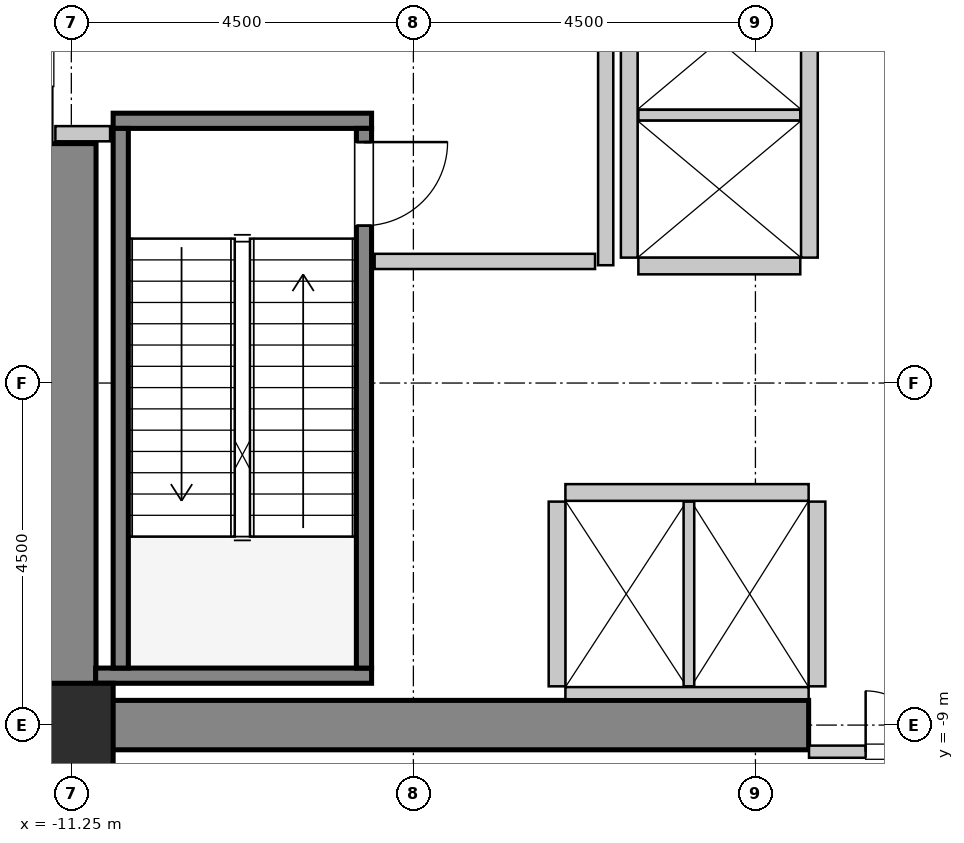
"""IFC4 building model, lengths in metres.
Left out: names, types, materials, properties, quantities, classifications, styles, units other than length and angle.
Written with IfcOpenShell. Run it as: python <this file> out.ifc"""

import sys

from ifc_helpers import new_model, si_unit, direction, frame, frame_2d, origin, origin_2d, place, context, subcontext, project, spatial, rectangle, hollow_rectangle, extrude, source, transform, mapped, element, fill, save


model = new_model("IFC4")
c1 = context("Model", 3, precision=1e-05, world=origin(), true_north=direction((0.0, 1.0)))
c2 = subcontext(c1, "Body", "Model", "MODEL_VIEW")
j1 = project(units=[si_unit("LENGTHUNIT", "METRE"), si_unit("PLANEANGLEUNIT", "RADIAN")], contexts=[c1])
p1 = place(None, origin())
s1 = spatial("IfcSite", under=j1, at=p1, CompositionType="ELEMENT")
p2 = place(p1, origin())
s2 = spatial("IfcBuilding", under=s1, at=p2, CompositionType="ELEMENT")
p3 = place(p2, frame((0.0, 0.0, 27.6)))
s3 = spatial("IfcBuildingStorey", under=s2, at=p3, CompositionType="ELEMENT", Elevation=27.6)
m1 = source(origin(), c2, "Body", "SweptSolid", [
    extrude(rectangle(XDim=10.025, YDim=0.65, at=frame_2d((5.012, 0.0))), origin(), (0.0, 0.0, 1.0), 5.4),
])
p4 = place(p3, frame((-11.575, -9.0, 0.0), z_axis=(0.0, 0.0, 1.0), x_axis=(1.0, 0.0, 0.0)))
e1 = element("IfcWall", 1, at=p4, inside=s3, PredefinedType="SHEAR", context=c2, shape_type="MappedRepresentation", body=[
    mapped(m1, transform((0.0, 0.0, 0.0), x_axis=(1.0, 0.0, 0.0), y_axis=(0.0, 1.0, 0.0), z_axis=(0.0, 0.0, 1.0), scale=1.0)),
])
m2 = source(origin(), c2, "Body", "SweptSolid", [
    extrude(rectangle(XDim=7.325, YDim=0.65, at=frame_2d((3.663, 0.0))), origin(), (0.0, 0.0, 1.0), 5.4),
])
p5 = place(p3, frame((-11.25, -8.675, 0.0), z_axis=(0.0, 0.0, 1.0), x_axis=(0.0, 1.0, 0.0)))
e2 = element("IfcWall", 2, at=p5, inside=s3, PredefinedType="SHEAR", context=c2, shape_type="MappedRepresentation", body=[
    mapped(m2, transform((0.0, 0.0, 0.0), x_axis=(1.0, 0.0, 0.0), y_axis=(0.0, 1.0, 0.0), z_axis=(0.0, 0.0, 1.0), scale=1.0)),
])
m3 = source(origin(), c2, "Body", "SweptSolid", [
    extrude(hollow_rectangle(XDim=1.1, YDim=1.1, WallThickness=0.055, InnerFilletRadius=0.055, OuterFilletRadius=0.11, at=origin_2d()), origin(), (0.0, 0.0, 1.0), 5.4),
])
p6 = place(p3, frame((-11.25, -9.0, 0.0), z_axis=(0.0, 0.0, 1.0), x_axis=(1.0, 0.0, 0.0)))
e3 = element("IfcColumn", 3, at=p6, inside=s3, PredefinedType="COLUMN", context=c2, shape_type="MappedRepresentation", body=[
    mapped(m3, transform((0.0, 0.0, 0.0), x_axis=(1.0, 0.0, 0.0), y_axis=(0.0, 1.0, 0.0), z_axis=(0.0, 0.0, 1.0), scale=1.0)),
])
m4 = source(origin(), c2, "Body", "SweptSolid", [
    extrude(rectangle(XDim=3.4, YDim=0.2, at=frame_2d((1.7, 0.0))), origin(), (0.0, 0.0, 1.0), 5.4),
])
p7 = place(p3, frame((-10.7, -1.05, 0.0), z_axis=(0.0, 0.0, 1.0), x_axis=(1.0, 0.0, 0.0)))
e4 = element("IfcWall", 4, at=p7, inside=s3, PredefinedType="SOLIDWALL", context=c2, shape_type="MappedRepresentation", body=[
    mapped(m4, transform((0.0, 0.0, 0.0), x_axis=(1.0, 0.0, 0.0), y_axis=(0.0, 1.0, 0.0), z_axis=(0.0, 0.0, 1.0), scale=1.0)),
])
m5 = source(origin(), c2, "Body", "SweptSolid", [
    extrude(rectangle(XDim=3.63, YDim=0.2, at=frame_2d((1.815, 0.0))), origin(), (0.0, 0.0, 1.0), 5.4),
])
p8 = place(p3, frame((-10.93, -8.35, 0.0), z_axis=(0.0, 0.0, 1.0), x_axis=(1.0, 0.0, 0.0)))
e5 = element("IfcWall", 5, at=p8, inside=s3, PredefinedType="SOLIDWALL", context=c2, shape_type="MappedRepresentation", body=[
    mapped(m5, transform((0.0, 0.0, 0.0), x_axis=(1.0, 0.0, 0.0), y_axis=(0.0, 1.0, 0.0), z_axis=(0.0, 0.0, 1.0), scale=1.0)),
])
m6 = source(origin(), c2, "Body", "SweptSolid", [
    extrude(rectangle(XDim=7.1, YDim=0.2, at=frame_2d((3.55, 0.0))), origin(), (0.0, 0.0, 1.0), 5.4),
])
p9 = place(p3, frame((-10.6, -1.15, 0.0), z_axis=(0.0, 0.0, 1.0), x_axis=(0.0, -1.0, 0.0)))
e6 = element("IfcWall", 6, at=p9, inside=s3, PredefinedType="SOLIDWALL", context=c2, shape_type="MappedRepresentation", body=[
    mapped(m6, transform((0.0, 0.0, 0.0), x_axis=(1.0, 0.0, 0.0), y_axis=(0.0, 1.0, 0.0), z_axis=(0.0, 0.0, 1.0), scale=1.0)),
])
p10 = place(p3, frame((-7.4, -1.15, 0.0), z_axis=(0.0, 0.0, 1.0), x_axis=(0.0, -1.0, 0.0)))
e7 = element("IfcWall", 7, at=p10, inside=s3, PredefinedType="SOLIDWALL", context=c2, shape_type="MappedRepresentation", body=[
    mapped(m6, transform((0.0, 0.0, 0.0), x_axis=(1.0, 0.0, 0.0), y_axis=(0.0, 1.0, 0.0), z_axis=(0.0, 0.0, 1.0), scale=1.0)),
])
p11 = place(p10, frame((0.18, 0.0, 0.0)))
e8 = element("IfcOpeningElement", 8, at=p11, cuts=e7, PredefinedType="OPENING", context=c2, shape_type="SweptSolid", body=[
    extrude(rectangle(XDim=1.1, YDim=2.15, at=frame_2d((0.55, 1.075))), frame((0.0, 0.11, 0.0), z_axis=(0.0, -1.0, 0.0), x_axis=(1.0, 0.0, 0.0)), (0.0, 0.0, 1.0), 0.22),
])
m7 = source(origin(), c2, "Body", "SweptSolid", [
    extrude(rectangle(XDim=3.2, YDim=0.22, at=frame_2d((1.6, 0.0))), origin(), (0.0, 0.0, 1.0), 5.135),
])
p12 = place(p3, frame((-1.55, -5.94, 0.0), z_axis=(0.0, 0.0, 1.0), x_axis=(-1.0, 0.0, 0.0)))
e9 = element("IfcWall", 9, at=p12, inside=s3, PredefinedType="SOLIDWALL", context=c2, shape_type="MappedRepresentation", body=[
    mapped(m7, transform((0.0, 0.0, 0.0), x_axis=(1.0, 0.0, 0.0), y_axis=(0.0, 1.0, 0.0), z_axis=(0.0, 0.0, 1.0), scale=1.0)),
])
m8 = source(origin(), c2, "Body", "SweptSolid", [
    extrude(rectangle(XDim=3.2, YDim=0.16, at=frame_2d((1.6, 0.0))), origin(), (0.0, 0.0, 1.0), 4.025),
])
p13 = place(p3, frame((-4.75, -8.58, 0.0), z_axis=(0.0, 0.0, 1.0), x_axis=(1.0, 0.0, 0.0)))
e10 = element("IfcWall", 10, at=p13, inside=s3, PredefinedType="PARTITIONING", context=c2, shape_type="MappedRepresentation", body=[
    mapped(m8, transform((0.0, 0.0, 0.0), x_axis=(1.0, 0.0, 0.0), y_axis=(0.0, 1.0, 0.0), z_axis=(0.0, 0.0, 1.0), scale=1.0)),
])
m9 = source(origin(), c2, "Body", "SweptSolid", [
    extrude(rectangle(XDim=2.43, YDim=0.22, at=frame_2d((1.215, 0.0))), origin(), (0.0, 0.0, 1.0), 5.135),
])
p14 = place(p3, frame((-4.86, -6.06, 0.0), z_axis=(0.0, 0.0, 1.0), x_axis=(0.0, -1.0, 0.0)))
e11 = element("IfcWall", 11, at=p14, inside=s3, PredefinedType="SOLIDWALL", context=c2, shape_type="MappedRepresentation", body=[
    mapped(m9, transform((0.0, 0.0, 0.0), x_axis=(1.0, 0.0, 0.0), y_axis=(0.0, 1.0, 0.0), z_axis=(0.0, 0.0, 1.0), scale=1.0)),
])
m10 = source(origin(), c2, "Body", "SweptSolid", [
    extrude(rectangle(XDim=2.43, YDim=0.14, at=frame_2d((1.215, 0.0))), origin(), (0.0, 0.0, 1.0), 5.135),
])
p15 = place(p3, frame((-3.125, -8.49, 0.0), z_axis=(0.0, 0.0, 1.0), x_axis=(0.0, 1.0, 0.0)))
e12 = element("IfcWall", 12, at=p15, inside=s3, PredefinedType="PARTITIONING", context=c2, shape_type="MappedRepresentation", body=[
    mapped(m10, transform((0.0, 0.0, 0.0), x_axis=(1.0, 0.0, 0.0), y_axis=(0.0, 1.0, 0.0), z_axis=(0.0, 0.0, 1.0), scale=1.0)),
])
p16 = place(p3, frame((-1.44, -8.49, 0.0), z_axis=(0.0, 0.0, 1.0), x_axis=(0.0, 1.0, 0.0)))
e13 = element("IfcWall", 13, at=p16, inside=s3, PredefinedType="SOLIDWALL", context=c2, shape_type="MappedRepresentation", body=[
    mapped(m9, transform((0.0, 0.0, 0.0), x_axis=(1.0, 0.0, 0.0), y_axis=(0.0, 1.0, 0.0), z_axis=(0.0, 0.0, 1.0), scale=1.0)),
])
m11 = source(origin(), c2, "Body", "SweptSolid", [
    extrude(rectangle(XDim=5.7, YDim=0.22, at=frame_2d((2.85, 0.0))), origin(), (0.0, 0.0, 1.0), 5.135),
])
for number, where, z_axis, x_axis in (
    (14, (-1.54, -2.85, 0.0), (0.0, 0.0, 1.0), (0.0, 1.0, 0.0)),
    (15, (-3.91, 2.85, 0.0), (0.0, 0.0, 1.0), (0.0, -1.0, 0.0)),
):
    element("IfcWall", number, at=place(p3, frame(where, z_axis=z_axis, x_axis=x_axis)), inside=s3, PredefinedType="SOLIDWALL", context=c2, shape_type="MappedRepresentation", body=[
        mapped(m11, transform((0.0, 0.0, 0.0), x_axis=(1.0, 0.0, 0.0), y_axis=(0.0, 1.0, 0.0), z_axis=(0.0, 0.0, 1.0), scale=1.0)),
    ])
m12 = source(origin(), c2, "Body", "SweptSolid", [
    extrude(rectangle(XDim=2.13, YDim=0.22, at=frame_2d((1.065, 0.0))), origin(), (0.0, 0.0, 1.0), 5.135),
])
p17 = place(p3, frame((-3.79, -2.96, 0.0), z_axis=(0.0, 0.0, 1.0), x_axis=(1.0, 0.0, 0.0)))
e16 = element("IfcWall", 16, at=p17, inside=s3, PredefinedType="SOLIDWALL", context=c2, shape_type="MappedRepresentation", body=[
    mapped(m12, transform((0.0, 0.0, 0.0), x_axis=(1.0, 0.0, 0.0), y_axis=(0.0, 1.0, 0.0), z_axis=(0.0, 0.0, 1.0), scale=1.0)),
])
m13 = source(origin(), c2, "Body", "SweptSolid", [
    extrude(rectangle(XDim=2.13, YDim=0.14, at=frame_2d((1.065, 0.0))), origin(), (0.0, 0.0, 1.0), 5.135),
])
p18 = place(p3, frame((-3.79, -0.975, 0.0), z_axis=(0.0, 0.0, 1.0), x_axis=(1.0, 0.0, 0.0)))
e17 = element("IfcWall", 17, at=p18, inside=s3, PredefinedType="PARTITIONING", context=c2, shape_type="MappedRepresentation", body=[
    mapped(m13, transform((0.0, 0.0, 0.0), x_axis=(1.0, 0.0, 0.0), y_axis=(0.0, 1.0, 0.0), z_axis=(0.0, 0.0, 1.0), scale=1.0)),
])
m14 = source(origin(), c2, "Body", "SweptSolid", [
    extrude(rectangle(XDim=5.9, YDim=0.2, at=frame_2d((2.95, 0.0))), origin(), (0.0, 0.0, 1.0), 5.135),
])
p19 = place(p3, frame((-4.22, -2.95, 0.0), z_axis=(0.0, 0.0, 1.0), x_axis=(0.0, 1.0, 0.0)))
e18 = element("IfcWall", 18, at=p19, inside=s3, PredefinedType="PARTITIONING", context=c2, shape_type="MappedRepresentation", body=[
    mapped(m14, transform((0.0, 0.0, 0.0), x_axis=(1.0, 0.0, 0.0), y_axis=(0.0, 1.0, 0.0), z_axis=(0.0, 0.0, 1.0), scale=1.0)),
])
m15 = source(origin(), c2, "Body", "SweptSolid", [
    extrude(rectangle(XDim=2.9, YDim=0.2, at=frame_2d((1.45, 0.0))), origin(), (0.0, 0.0, 1.0), 5.135),
])
p20 = place(p3, frame((-7.26, -2.9, 0.0), z_axis=(0.0, 0.0, 1.0), x_axis=(1.0, 0.0, 0.0)))
e19 = element("IfcWall", 19, at=p20, inside=s3, PredefinedType="PARTITIONING", context=c2, shape_type="MappedRepresentation", body=[
    mapped(m15, transform((0.0, 0.0, 0.0), x_axis=(1.0, 0.0, 0.0), y_axis=(0.0, 1.0, 0.0), z_axis=(0.0, 0.0, 1.0), scale=1.0)),
])
m16 = source(origin(), c2, "Body", "SweptSolid", [
    extrude(rectangle(XDim=0.72, YDim=0.2, at=frame_2d((0.36, 0.0))), origin(), (0.0, 0.0, 1.0), 5.135),
])
p21 = place(p3, frame((-11.46, -1.22, 0.0), z_axis=(0.0, 0.0, 1.0), x_axis=(1.0, 0.0, 0.0)))
e20 = element("IfcWall", 20, at=p21, inside=s3, PredefinedType="PARTITIONING", context=c2, shape_type="MappedRepresentation", body=[
    mapped(m16, transform((0.0, 0.0, 0.0), x_axis=(1.0, 0.0, 0.0), y_axis=(0.0, 1.0, 0.0), z_axis=(0.0, 0.0, 1.0), scale=1.0)),
])
m17 = source(origin(), c2, "Body", "SweptSolid", [
    extrude(rectangle(XDim=3.09, YDim=0.16, at=frame_2d((1.545, 0.0))), origin(), (0.0, 0.0, 1.0), 4.025),
])
p22 = place(p3, frame((-1.545, -9.35, 0.0), z_axis=(0.0, 0.0, 1.0), x_axis=(1.0, 0.0, 0.0)))
e21 = element("IfcWall", 21, at=p22, inside=s3, PredefinedType="PARTITIONING", context=c2, shape_type="MappedRepresentation", body=[
    mapped(m17, transform((0.0, 0.0, 0.0), x_axis=(1.0, 0.0, 0.0), y_axis=(0.0, 1.0, 0.0), z_axis=(0.0, 0.0, 1.0), scale=1.0)),
])
p23 = place(p22, frame((0.745, 0.0, 0.0)))
e22 = element("IfcOpeningElement", 22, at=p23, cuts=e21, PredefinedType="OPENING", context=c2, shape_type="SweptSolid", body=[
    extrude(rectangle(XDim=1.6, YDim=2.3, at=frame_2d((0.8, 1.15))), frame((0.0, 0.09, 0.0), z_axis=(0.0, -1.0, 0.0), x_axis=(1.0, 0.0, 0.0)), (0.0, 0.0, 1.0), 0.18),
])
m18 = source(origin(), c2, "Body", "SweptSolid", [
    extrude(rectangle(XDim=1.1, YDim=2.15, at=frame_2d((0.55, 1.075))), frame((0.0, 0.025, 0.0), z_axis=(0.0, -1.0, 0.0), x_axis=(1.0, 0.0, 0.0)), (0.0, 0.0, 1.0), 0.05),
])
p24 = place(p11, origin())
e23 = element("IfcDoor", 23, at=p24, inside=s3, OperationType="SINGLE_SWING_LEFT", PredefinedType="DOOR", context=c2, shape_type="MappedRepresentation", body=[
    mapped(m18, transform((0.0, 0.0, 0.0), x_axis=(1.0, 0.0, 0.0), y_axis=(0.0, 1.0, 0.0), z_axis=(0.0, 0.0, 1.0), scale=1.0)),
])
fill(e8, e23)
m19 = source(origin(), c2, "Body", "SweptSolid", [
    extrude(rectangle(XDim=1.6, YDim=2.3, at=frame_2d((0.8, 1.15))), frame((0.0, 0.025, 0.0), z_axis=(0.0, -1.0, 0.0), x_axis=(1.0, 0.0, 0.0)), (0.0, 0.0, 1.0), 0.05),
])
p25 = place(p23, origin())
e24 = element("IfcDoor", 24, at=p25, inside=s3, OperationType="DOUBLE_DOOR_SINGLE_SWING", PredefinedType="DOOR", context=c2, shape_type="MappedRepresentation", body=[
    mapped(m19, transform((0.0, 0.0, 0.0), x_axis=(1.0, 0.0, 0.0), y_axis=(0.0, 1.0, 0.0), z_axis=(0.0, 0.0, 1.0), scale=1.0)),
])
fill(e22, e24)
save(model, sys.argv[1])
